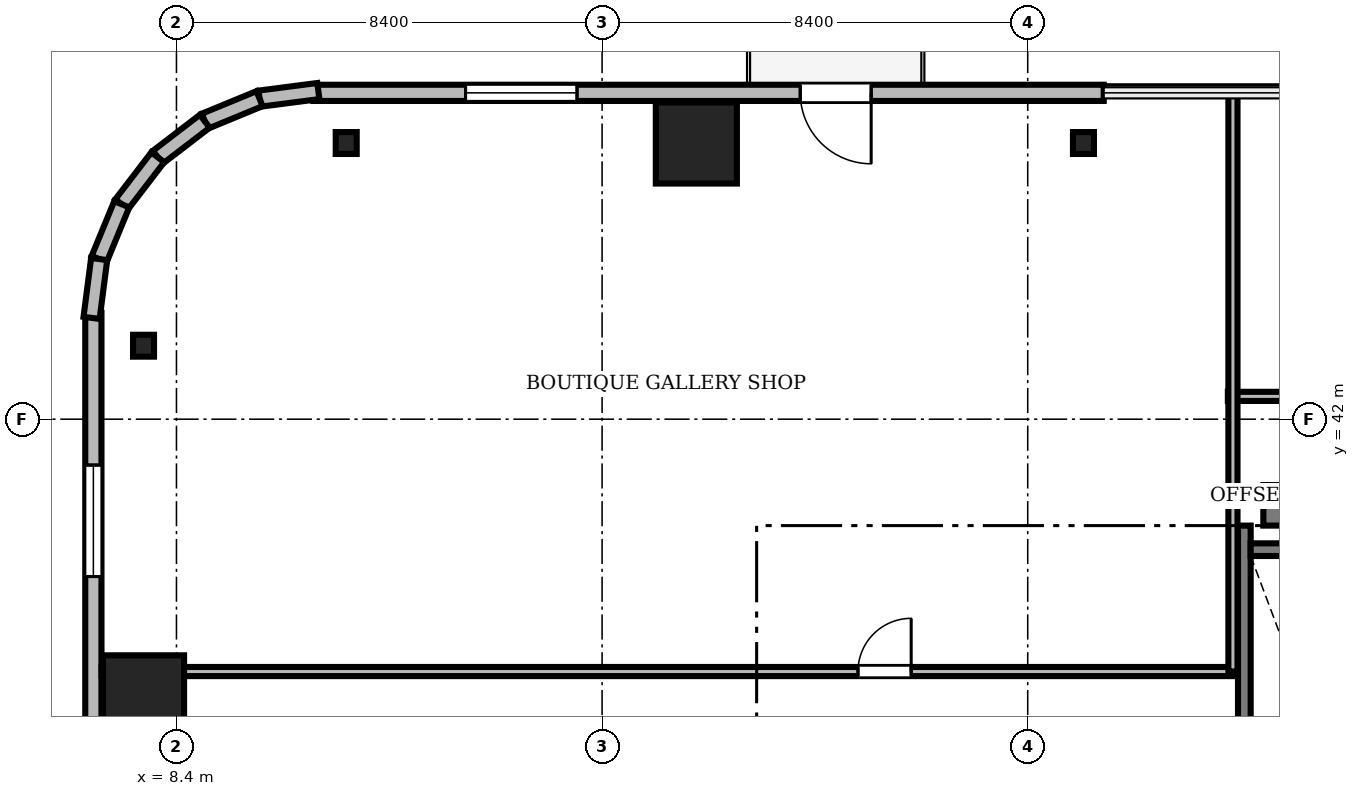
"""IFC4 building model, lengths in metres.
Left out: names, types, materials, properties, quantities, classifications, styles, units other than length and angle.
Written with IfcOpenShell. Run it as: python <this file> out.ifc"""

import sys

from ifc_helpers import new_model, si_unit, direction, frame, frame_2d, origin, origin_2d, place, context, subcontext, project, spatial, rectangle, i_section, extrude, source, transform, mapped, element, fill, save


model = new_model("IFC4")
c1 = context("Model", 3, precision=1e-05, world=origin(), true_north=direction((0.0, 1.0)))
c2 = subcontext(c1, "Body", "Model", "MODEL_VIEW")
j1 = project(units=[si_unit("LENGTHUNIT", "METRE"), si_unit("PLANEANGLEUNIT", "RADIAN")], contexts=[c1])
p1 = place(None, origin())
s1 = spatial("IfcSite", under=j1, at=p1, CompositionType="ELEMENT")
p2 = place(p1, origin())
s2 = spatial("IfcBuilding", under=s1, at=p2, CompositionType="ELEMENT")
p3 = place(p2, frame((0.0, 0.0, 115.0)))
s3 = spatial("IfcBuildingStorey", under=s2, at=p3, CompositionType="ELEMENT", Elevation=115.0)
m1 = source(origin(), c2, "Body", "SweptSolid", [
    extrude(rectangle(XDim=17.52, YDim=0.8, at=frame_2d((8.76, 0.0))), origin(), (0.0, 0.0, 1.0), 3.46),
])
p4 = place(p3, frame((29.85, 40.3, 0.0), z_axis=(0.0, 0.0, 1.0), x_axis=(1.0, 0.0, 0.0)))
e1 = element("IfcWall", 1, at=p4, inside=s3, PredefinedType="SHEAR", context=c2, shape_type="MappedRepresentation", body=[
    mapped(m1, transform((0.0, 0.0, 0.0), scale=1.0)),
])
m2 = source(origin(), c2, "Body", "SweptSolid", [
    extrude(rectangle(XDim=1.6, YDim=1.6, at=origin_2d()), origin(), (0.0, 0.0, 1.0), 3.46),
])
for number, where, z_axis, x_axis in (
    (2, (18.66, 47.45, 0.0), (0.0, 0.0, 1.0), (1.0, 0.0, 0.0)),
    (3, (7.75, 36.54, 0.0), (0.0, 0.0, 1.0), (1.0, 0.0, 0.0)),
):
    element("IfcColumn", number, at=place(p3, frame(where, z_axis=z_axis, x_axis=x_axis)), inside=s3, PredefinedType="COLUMN", context=c2, shape_type="MappedRepresentation", body=[
        mapped(m2, transform((0.0, 0.0, 0.0), scale=1.0)),
    ])
m3 = source(origin(), c2, "Body", "SweptSolid", [
    extrude(i_section(OverallWidth=0.414, OverallDepth=0.432, WebThickness=0.026, FlangeThickness=0.04, FilletRadius=0.015, at=origin_2d()), origin(), (0.0, 0.0, 1.0), 3.46),
])
for number, where, z_axis, x_axis in (
    (4, (26.3, 47.45, 0.0), (0.0, 0.0, 1.0), (1.0, 0.0, 0.0)),
    (5, (11.75, 47.45, 0.0), (0.0, 0.0, 1.0), (1.0, 0.0, 0.0)),
    (6, (7.75, 43.45, 0.0), (0.0, 0.0, 1.0), (1.0, 0.0, 0.0)),
):
    element("IfcColumn", number, at=place(p3, frame(where, z_axis=z_axis, x_axis=x_axis)), inside=s3, PredefinedType="COLUMN", context=c2, shape_type="MappedRepresentation", body=[
        mapped(m3, transform((0.0, 0.0, 0.0), scale=1.0)),
    ])
m4 = source(origin(), c2, "Body", "SweptSolid", [
    extrude(rectangle(XDim=15.6, YDim=0.32, at=frame_2d((7.8, 0.0))), origin(), (0.0, 0.0, 1.0), 3.46),
])
p5 = place(p3, frame((26.7, 48.44, 0.0), z_axis=(0.0, 0.0, 1.0), x_axis=(-1.0, 0.0, 0.0)))
e7 = element("IfcWall", 7, at=p5, inside=s3, PredefinedType="SOLIDWALL", context=c2, shape_type="MappedRepresentation", body=[
    mapped(m4, transform((0.0, 0.0, 0.0), scale=1.0)),
])
m5 = source(origin(), c2, "Body", "SweptSolid", [
    extrude(rectangle(XDim=1.4, YDim=2.3, at=frame_2d((0.7, 1.15))), frame((0.0, 0.17, 0.0), z_axis=(0.0, -1.0, 0.0), x_axis=(1.0, 0.0, 0.0)), (0.0, 0.0, 1.0), 0.34),
])
p6 = place(p5, frame((4.59, 0.0, 0.0)))
e8 = element("IfcOpeningElement", 8, at=p6, cuts=e7, PredefinedType="OPENING", context=c2, shape_type="MappedRepresentation", body=[
    mapped(m5, transform((0.0, 0.0, 0.0), scale=1.0)),
])
m6 = source(origin(), c2, "Body", "SweptSolid", [
    extrude(rectangle(XDim=2.2, YDim=2.4, at=frame_2d((1.1, 1.2))), frame((0.0, 0.17, 0.0), z_axis=(0.0, -1.0, 0.0), x_axis=(1.0, 0.0, 0.0)), (0.0, 0.0, 1.0), 0.34),
])
p7 = place(p5, frame((10.395, 0.0, 0.72)))
e9 = element("IfcOpeningElement", 9, at=p7, cuts=e7, PredefinedType="OPENING", context=c2, shape_type="MappedRepresentation", body=[
    mapped(m6, transform((0.0, 0.0, 0.0), scale=1.0)),
])
m7 = source(origin(), c2, "Body", "SweptSolid", [
    extrude(rectangle(XDim=15.6, YDim=0.32, at=frame_2d((7.8, 0.0))), origin(), (0.0, 0.0, 1.0), 3.46),
])
p8 = place(p3, frame((6.76, 44.1, 0.0), z_axis=(0.0, 0.0, 1.0), x_axis=(0.0, -1.0, 0.0)))
e10 = element("IfcWall", 10, at=p8, inside=s3, PredefinedType="SOLIDWALL", context=c2, shape_type="MappedRepresentation", body=[
    mapped(m7, transform((0.0, 0.0, 0.0), scale=1.0)),
])
p9 = place(p8, frame((3.005, 0.0, 0.72)))
e11 = element("IfcOpeningElement", 11, at=p9, cuts=e10, PredefinedType="OPENING", context=c2, shape_type="MappedRepresentation", body=[
    mapped(m6, transform((0.0, 0.0, 0.0), scale=1.0)),
])
m8 = source(origin(), c2, "Body", "SweptSolid", [
    extrude(rectangle(XDim=1.17, YDim=0.32, at=frame_2d((0.585, 0.0))), origin(), (0.0, 0.0, 1.0), 3.46),
])
p10 = place(p3, frame((11.2, 48.476, 0.0), z_axis=(0.0, 0.0, 1.0), x_axis=(-0.991735963317, -0.128295670475, 0.0)))
e12 = element("IfcWall", 12, at=p10, inside=s3, PredefinedType="SOLIDWALL", context=c2, shape_type="MappedRepresentation", body=[
    mapped(m8, transform((0.0, 0.0, 0.0), scale=1.0)),
])
m9 = source(origin(), c2, "Body", "SweptSolid", [
    extrude(rectangle(XDim=1.169, YDim=0.32, at=frame_2d((0.584, 0.0))), origin(), (0.0, 0.0, 1.0), 3.46),
])
p11 = place(p3, frame((10.04, 48.325, 0.0), z_axis=(0.0, 0.0, 1.0), x_axis=(-0.924552646638, -0.381054331552, 0.0)))
e13 = element("IfcWall", 13, at=p11, inside=s3, PredefinedType="SOLIDWALL", context=c2, shape_type="MappedRepresentation", body=[
    mapped(m9, transform((0.0, 0.0, 0.0), scale=1.0)),
])
m10 = source(origin(), c2, "Body", "SweptSolid", [
    extrude(rectangle(XDim=1.169, YDim=0.32, at=frame_2d((0.584, 0.0))), origin(), (0.0, 0.0, 1.0), 3.46),
])
p12 = place(p3, frame((8.959, 47.88, 0.0), z_axis=(0.0, 0.0, 1.0), x_axis=(-0.793663520347, -0.608356981114, 0.0)))
e14 = element("IfcWall", 14, at=p12, inside=s3, PredefinedType="SOLIDWALL", context=c2, shape_type="MappedRepresentation", body=[
    mapped(m10, transform((0.0, 0.0, 0.0), scale=1.0)),
])
m11 = source(origin(), c2, "Body", "SweptSolid", [
    extrude(rectangle(XDim=1.169, YDim=0.32, at=frame_2d((0.584, 0.0))), origin(), (0.0, 0.0, 1.0), 3.46),
])
p13 = place(p3, frame((8.031, 47.169, 0.0), z_axis=(0.0, 0.0, 1.0), x_axis=(-0.608387696831, -0.793639975269, 0.0)))
e15 = element("IfcWall", 15, at=p13, inside=s3, PredefinedType="SOLIDWALL", context=c2, shape_type="MappedRepresentation", body=[
    mapped(m11, transform((0.0, 0.0, 0.0), scale=1.0)),
])
p14 = place(p3, frame((7.32, 46.241, 0.0), z_axis=(0.0, 0.0, 1.0), x_axis=(-0.381054331552, -0.924552646638, 0.0)))
e16 = element("IfcWall", 16, at=p14, inside=s3, PredefinedType="SOLIDWALL", context=c2, shape_type="MappedRepresentation", body=[
    mapped(m9, transform((0.0, 0.0, 0.0), scale=1.0)),
])
p15 = place(p3, frame((6.875, 45.16, 0.0), z_axis=(0.0, 0.0, 1.0), x_axis=(-0.128295670475, -0.991735963317, 0.0)))
e17 = element("IfcWall", 17, at=p15, inside=s3, PredefinedType="SOLIDWALL", context=c2, shape_type="MappedRepresentation", body=[
    mapped(m8, transform((0.0, 0.0, 0.0), scale=1.0)),
])
m12 = source(origin(), c2, "Body", "SweptSolid", [
    extrude(rectangle(XDim=9.25, YDim=0.25, at=frame_2d((4.625, 0.0))), origin(), (0.0, 0.0, 1.0), 3.5),
])
p16 = place(p3, frame((29.475, 30.65, 0.0), z_axis=(0.0, 0.0, 1.0), x_axis=(0.0, 1.0, 0.0)))
e18 = element("IfcWall", 18, at=p16, inside=s3, PredefinedType="SOLIDWALL", context=c2, shape_type="MappedRepresentation", body=[
    mapped(m12, transform((0.0, 0.0, 0.0), scale=1.0)),
])
m13 = source(origin(), c2, "Body", "SweptSolid", [
    extrude(rectangle(XDim=3.15, YDim=0.25, at=frame_2d((1.575, 0.0))), origin(), (0.0, 0.0, 1.0), 3.5),
])
p17 = place(p3, frame((29.6, 39.425, 0.0), z_axis=(0.0, 0.0, 1.0), x_axis=(1.0, 0.0, 0.0)))
e19 = element("IfcWall", 19, at=p17, inside=s3, PredefinedType="SOLIDWALL", context=c2, shape_type="MappedRepresentation", body=[
    mapped(m13, transform((0.0, 0.0, 0.0), scale=1.0)),
])
m14 = source(origin(), c2, "Body", "SweptSolid", [
    extrude(rectangle(XDim=23.928, YDim=0.18, at=frame_2d((11.964, 0.0))), origin(), (0.0, 0.0, 1.0), 2.702),
])
p18 = place(p3, frame((29.15, 42.45, 0.0), z_axis=(0.0, 0.0, 1.0), x_axis=(1.0, 0.0, 0.0)))
e20 = element("IfcWall", 20, at=p18, inside=s3, PredefinedType="PARTITIONING", context=c2, shape_type="MappedRepresentation", body=[
    mapped(m14, transform((0.0, 0.0, 0.0), scale=1.0)),
])
m15 = source(origin(), c2, "Body", "SweptSolid", [
    extrude(rectangle(XDim=1.05, YDim=2.2, at=frame_2d((0.525, 1.1))), frame((0.0, 0.1, 0.0), z_axis=(0.0, -1.0, 0.0), x_axis=(1.0, 0.0, 0.0)), (0.0, 0.0, 1.0), 0.2),
])
p19 = place(p18, frame((4.5, 0.0, 0.0)))
e21 = element("IfcOpeningElement", 21, at=p19, cuts=e20, PredefinedType="OPENING", context=c2, shape_type="MappedRepresentation", body=[
    mapped(m15, transform((0.0, 0.0, 0.0), scale=1.0)),
])
m16 = source(origin(), c2, "Body", "SweptSolid", [
    extrude(rectangle(XDim=22.328, YDim=0.18, at=frame_2d((11.164, 0.0))), origin(), (0.0, 0.0, 1.0), 2.702),
])
p20 = place(p3, frame((6.922, 37.02, 0.0), z_axis=(0.0, 0.0, 1.0), x_axis=(1.0, 0.0, 0.0)))
e22 = element("IfcWall", 22, at=p20, inside=s3, PredefinedType="PARTITIONING", context=c2, shape_type="MappedRepresentation", body=[
    mapped(m16, transform((0.0, 0.0, 0.0), scale=1.0)),
])
p21 = place(p20, frame((14.928, 0.0, 0.0)))
e23 = element("IfcOpeningElement", 23, at=p21, cuts=e22, PredefinedType="OPENING", context=c2, shape_type="MappedRepresentation", body=[
    mapped(m15, transform((0.0, 0.0, 0.0), scale=1.0)),
])
m17 = source(origin(), c2, "Body", "SweptSolid", [
    extrude(rectangle(XDim=11.45, YDim=0.18, at=frame_2d((5.725, 0.0))), origin(), (0.0, 0.0, 1.0), 2.702),
])
p22 = place(p3, frame((29.25, 37.02, 0.0), z_axis=(0.0, 0.0, 1.0), x_axis=(0.0, 1.0, 0.0)))
e24 = element("IfcWall", 24, at=p22, inside=s3, PredefinedType="PARTITIONING", context=c2, shape_type="MappedRepresentation", body=[
    mapped(m17, transform((0.0, 0.0, 0.0), scale=1.0)),
])
m18 = source(origin(), c2, "Body", "SweptSolid", [
    extrude(rectangle(XDim=1.4, YDim=2.3, at=frame_2d((0.7, 1.15))), frame((0.0, 0.025, 0.0), z_axis=(0.0, -1.0, 0.0), x_axis=(1.0, 0.0, 0.0)), (0.0, 0.0, 1.0), 0.05),
])
p23 = place(p6, frame((1.4, 0.0, 0.0), z_axis=(0.0, 0.0, 1.0), x_axis=(-1.0, 0.0, 0.0)))
e25 = element("IfcDoor", 25, at=p23, inside=s3, OperationType="DOUBLE_DOOR_SLIDING", PredefinedType="DOOR", context=c2, shape_type="MappedRepresentation", body=[
    mapped(m18, transform((0.0, 0.0, 0.0), scale=1.0)),
])
fill(e8, e25)
m19 = source(origin(), c2, "Body", "SweptSolid", [
    extrude(rectangle(XDim=2.2, YDim=2.4, at=frame_2d((1.1, 1.2))), frame((0.0, 0.03, 0.0), z_axis=(0.0, -1.0, 0.0), x_axis=(1.0, 0.0, 0.0)), (0.0, 0.0, 1.0), 0.06),
])
p24 = place(p7, origin())
e26 = element("IfcWindow", 26, at=p24, inside=s3, PartitioningType="SINGLE_PANEL", PredefinedType="WINDOW", context=c2, shape_type="MappedRepresentation", body=[
    mapped(m19, transform((0.0, 0.0, 0.0), scale=1.0)),
])
fill(e9, e26)
p25 = place(p9, origin())
e27 = element("IfcWindow", 27, at=p25, inside=s3, PartitioningType="SINGLE_PANEL", PredefinedType="WINDOW", context=c2, shape_type="MappedRepresentation", body=[
    mapped(m19, transform((0.0, 0.0, 0.0), scale=1.0)),
])
fill(e11, e27)
m20 = source(origin(), c2, "Body", "SweptSolid", [
    extrude(rectangle(XDim=1.05, YDim=2.2, at=frame_2d((0.525, 1.1))), frame((0.0, 0.025, 0.0), z_axis=(0.0, -1.0, 0.0), x_axis=(1.0, 0.0, 0.0)), (0.0, 0.0, 1.0), 0.05),
])
p26 = place(p21, origin())
e28 = element("IfcDoor", 28, at=p26, inside=s3, OperationType="SINGLE_SWING_RIGHT", PredefinedType="DOOR", context=c2, shape_type="MappedRepresentation", body=[
    mapped(m20, transform((0.0, 0.0, 0.0), scale=1.0)),
])
fill(e23, e28)
save(model, sys.argv[1])
